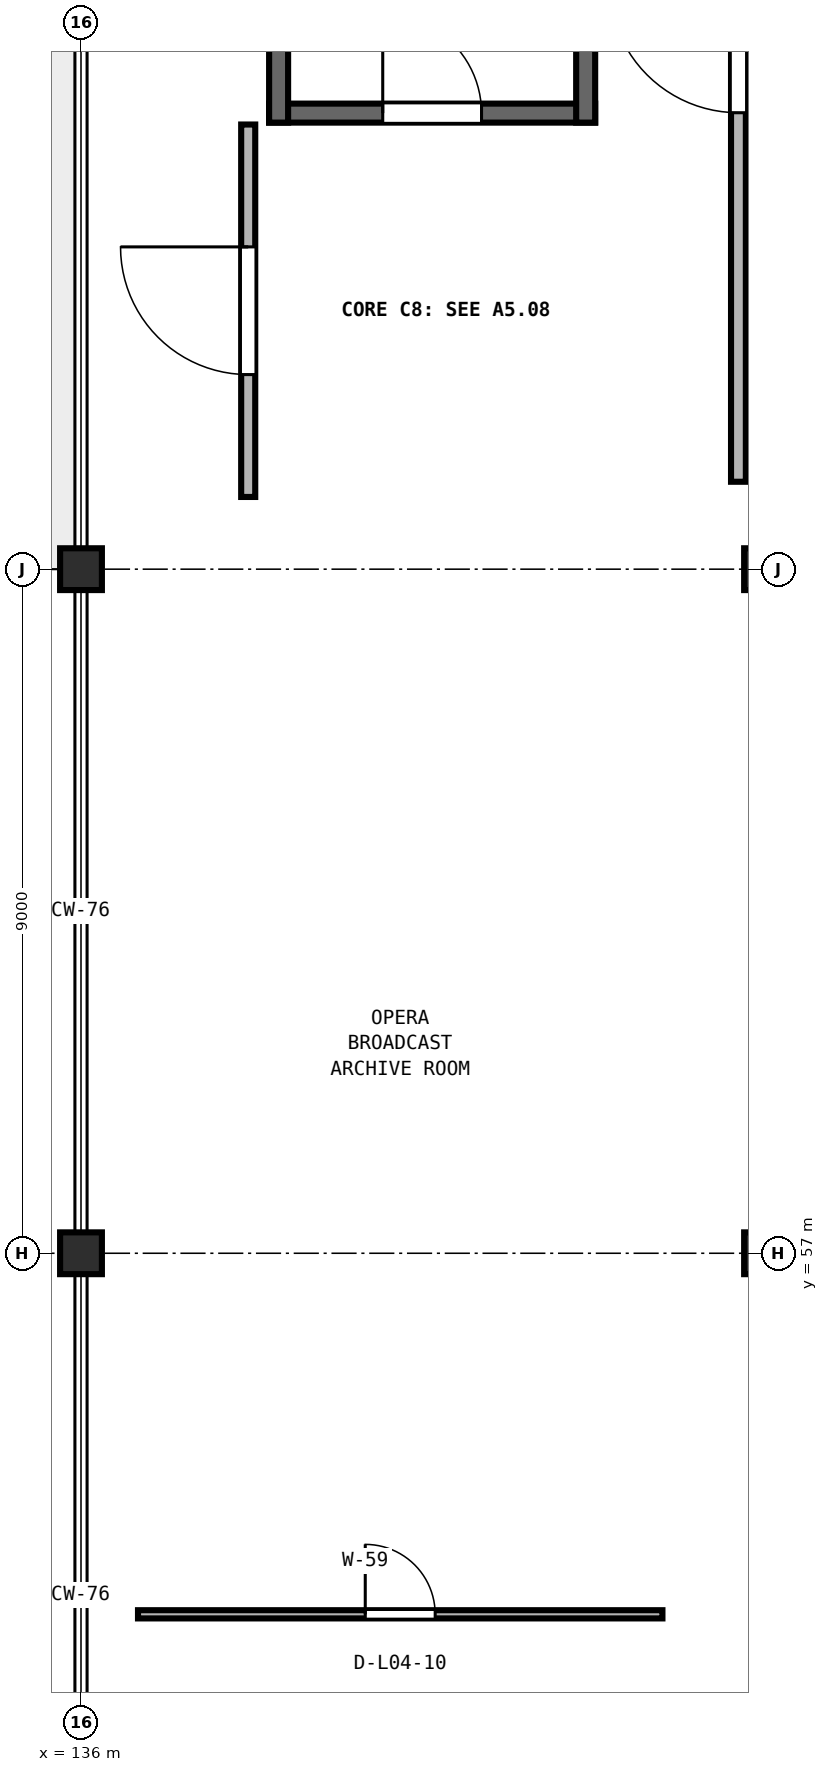
"""IFC4 building model, lengths in metres.
Left out: names, types, materials, properties, quantities, classifications, styles, units other than length and angle.
Written with IfcOpenShell. Run it as: python <this file> out.ifc"""

import sys

from ifc_helpers import new_model, si_unit, direction, frame, frame_2d, origin, origin_2d, place, context, subcontext, project, spatial, rectangle, extrude, element, fill, save


model = new_model("IFC4")
c1 = context("Model", 3, precision=1e-05, world=origin(), true_north=direction((0.0, 1.0)))
c2 = subcontext(c1, "Body", "Model", "MODEL_VIEW")
j1 = project(units=[si_unit("LENGTHUNIT", "METRE"), si_unit("PLANEANGLEUNIT", "RADIAN")], contexts=[c1])
p1 = place(None, origin())
s1 = spatial("IfcSite", under=j1, at=p1, CompositionType="ELEMENT")
p2 = place(p1, origin())
s2 = spatial("IfcBuilding", under=s1, at=p2, CompositionType="ELEMENT")
p3 = place(p2, frame((0.0, 0.0, 19.2)))
s3 = spatial("IfcBuildingStorey", under=s2, at=p3, CompositionType="ELEMENT", Elevation=19.2)
for number, where, z_axis, x_axis in (
    (1, (136.0, 57.0, 0.0), (0.0, 0.0, 1.0), (1.0, 0.0, 0.0)),
    (2, (136.0, 66.0, 0.0), (0.0, 0.0, 1.0), (1.0, 0.0, 0.0)),
    (3, (145.0, 57.0, 0.0), (0.0, 0.0, 1.0), (1.0, 0.0, 0.0)),
    (4, (145.0, 66.0, 0.0), (0.0, 0.0, 1.0), (1.0, 0.0, 0.0)),
):
    element("IfcColumn", number, at=place(p3, frame(where, z_axis=z_axis, x_axis=x_axis)), inside=s3, PredefinedType="COLUMN", context=c2, shape_type="SweptSolid", body=[
        extrude(rectangle(XDim=0.55, YDim=0.55, at=origin_2d()), origin(), (0.0, 0.0, 1.0), 4.25),
    ])
p4 = place(p3, frame((138.475, 72.0, 0.0), z_axis=(0.0, 0.0, 1.0), x_axis=(1.0, 0.0, 0.0)))
e5 = element("IfcWall", 5, at=p4, inside=s3, PredefinedType="SHEAR", context=c2, shape_type="SweptSolid", body=[
    extrude(rectangle(XDim=4.29, YDim=0.25, at=frame_2d((2.145, 0.0))), origin(), (0.0, 0.0, 1.0), 4.25),
])
p5 = place(p4, frame((1.495, 0.0, 0.0)))
e6 = element("IfcOpeningElement", 6, at=p5, cuts=e5, PredefinedType="OPENING", context=c2, shape_type="SweptSolid", body=[
    extrude(rectangle(XDim=1.3, YDim=2.18, at=frame_2d((0.65, 1.09))), frame((0.0, 0.135, 0.0), z_axis=(0.0, -1.0, 0.0), x_axis=(1.0, 0.0, 0.0)), (0.0, 0.0, 1.0), 0.27),
])
for number, where, z_axis, x_axis in (
    (7, (138.6, 71.875, 0.0), (0.0, 0.0, 1.0), (0.0, 1.0, 0.0)),
    (8, (142.64, 71.875, 0.0), (0.0, 0.0, 1.0), (0.0, 1.0, 0.0)),
):
    element("IfcWall", number, at=place(p3, frame(where, z_axis=z_axis, x_axis=x_axis)), inside=s3, PredefinedType="SHEAR", context=c2, shape_type="SweptSolid", body=[
        extrude(rectangle(XDim=11.09, YDim=0.25, at=frame_2d((5.545, 0.0))), origin(), (0.0, 0.0, 1.0), 4.25),
    ])
p6 = place(p3, frame((138.2, 66.95, 0.0), z_axis=(0.0, 0.0, 1.0), x_axis=(0.0, 1.0, 0.0)))
e9 = element("IfcWall", 9, at=p6, inside=s3, PredefinedType="PARTITIONING", context=c2, shape_type="SweptSolid", body=[
    extrude(rectangle(XDim=4.9, YDim=0.185, at=frame_2d((2.45, 0.0))), origin(), (0.0, 0.0, 1.0), 4.2),
])
p7 = place(p6, frame((1.61, 0.0, 0.0)))
e10 = element("IfcOpeningElement", 10, at=p7, cuts=e9, PredefinedType="OPENING", context=c2, shape_type="SweptSolid", body=[
    extrude(rectangle(XDim=1.68, YDim=2.25, at=frame_2d((0.84, 1.125))), frame((0.0, 0.103, 0.0), z_axis=(0.0, -1.0, 0.0), x_axis=(1.0, 0.0, 0.0)), (0.0, 0.0, 1.0), 0.205),
])
p8 = place(p3, frame((144.75, 65.95, 0.0), z_axis=(0.0, 0.0, 1.0), x_axis=(1.0, 0.0, 0.0)))
e11 = element("IfcWall", 11, at=p8, inside=s3, PredefinedType="MOVABLE", context=c2, shape_type="SweptSolid", body=[
    extrude(rectangle(XDim=8.9, YDim=0.152, at=frame_2d((4.45, 0.0))), origin(), (0.0, 0.0, 1.0), 3.79),
])
p9 = place(p8, frame((3.95, 0.0, 0.0)))
e12 = element("IfcOpeningElement", 12, at=p9, cuts=e11, PredefinedType="OPENING", context=c2, shape_type="SweptSolid", body=[
    extrude(rectangle(XDim=1.0, YDim=2.15, at=frame_2d((0.5, 1.075))), frame((0.0, 0.086, 0.0), z_axis=(0.0, -1.0, 0.0), x_axis=(1.0, 0.0, 0.0)), (0.0, 0.0, 1.0), 0.172),
])
p10 = place(p3, frame((144.65, 67.15, 0.0), z_axis=(0.0, 0.0, 1.0), x_axis=(0.0, 1.0, 0.0)))
e13 = element("IfcWall", 13, at=p10, inside=s3, PredefinedType="PARTITIONING", context=c2, shape_type="SweptSolid", body=[
    extrude(rectangle(XDim=16.3, YDim=0.195, at=frame_2d((8.15, 0.0))), origin(), (0.0, 0.0, 1.0), 3.793),
])
p11 = place(p10, frame((4.855, 0.0, 0.0)))
e14 = element("IfcOpeningElement", 14, at=p11, cuts=e13, PredefinedType="OPENING", context=c2, shape_type="SweptSolid", body=[
    extrude(rectangle(XDim=1.7, YDim=2.25, at=frame_2d((0.85, 1.125))), frame((0.0, 0.107, 0.0), z_axis=(0.0, -1.0, 0.0), x_axis=(1.0, 0.0, 0.0)), (0.0, 0.0, 1.0), 0.215),
])
p12 = place(p3, frame((136.75, 52.25, 0.0), z_axis=(0.0, 0.0, 1.0), x_axis=(1.0, 0.0, 0.0)))
e15 = element("IfcWall", 15, at=p12, inside=s3, PredefinedType="PARTITIONING", context=c2, shape_type="SweptSolid", body=[
    extrude(rectangle(XDim=6.9, YDim=0.108, at=frame_2d((3.45, 0.0))), origin(), (0.0, 0.0, 1.0), 4.2),
])
p13 = place(p12, frame((2.99, 0.0, 0.0)))
e16 = element("IfcOpeningElement", 16, at=p13, cuts=e15, PredefinedType="OPENING", context=c2, shape_type="SweptSolid", body=[
    extrude(rectangle(XDim=0.92, YDim=2.12, at=frame_2d((0.46, 1.06))), frame((0.0, 0.064, 0.0), z_axis=(0.0, -1.0, 0.0), x_axis=(1.0, 0.0, 0.0)), (0.0, 0.0, 1.0), 0.128),
])
p14 = place(p5, origin())
e17 = element("IfcDoor", 17, at=p14, inside=s3, OperationType="SINGLE_SWING_LEFT", PredefinedType="DOOR", context=c2, shape_type="SweptSolid", body=[
    extrude(rectangle(XDim=1.3, YDim=2.18, at=frame_2d((0.65, 1.09))), frame((0.0, 0.025, 0.0), z_axis=(0.0, -1.0, 0.0), x_axis=(1.0, 0.0, 0.0)), (0.0, 0.0, 1.0), 0.05),
])
fill(e6, e17)
p15 = place(p7, origin())
e18 = element("IfcDoor", 18, at=p15, inside=s3, OperationType="SINGLE_SWING_RIGHT", PredefinedType="DOOR", context=c2, shape_type="SweptSolid", body=[
    extrude(rectangle(XDim=1.68, YDim=2.25, at=frame_2d((0.84, 1.125))), frame((0.0, 0.025, 0.0), z_axis=(0.0, -1.0, 0.0), x_axis=(1.0, 0.0, 0.0)), (0.0, 0.0, 1.0), 0.05),
])
fill(e10, e18)
p16 = place(p11, origin())
e19 = element("IfcDoor", 19, at=p16, inside=s3, OperationType="SINGLE_SWING_RIGHT", PredefinedType="DOOR", context=c2, shape_type="SweptSolid", body=[
    extrude(rectangle(XDim=1.7, YDim=2.25, at=frame_2d((0.85, 1.125))), frame((0.0, 0.025, 0.0), z_axis=(0.0, -1.0, 0.0), x_axis=(1.0, 0.0, 0.0)), (0.0, 0.0, 1.0), 0.05),
])
fill(e14, e19)
p17 = place(p13, origin())
e20 = element("IfcDoor", 20, at=p17, inside=s3, OperationType="SINGLE_SWING_LEFT", PredefinedType="DOOR", context=c2, shape_type="SweptSolid", body=[
    extrude(rectangle(XDim=0.92, YDim=2.12, at=frame_2d((0.46, 1.06))), frame((0.0, 0.025, 0.0), z_axis=(0.0, -1.0, 0.0), x_axis=(1.0, 0.0, 0.0)), (0.0, 0.0, 1.0), 0.05),
])
fill(e16, e20)
save(model, sys.argv[1])
